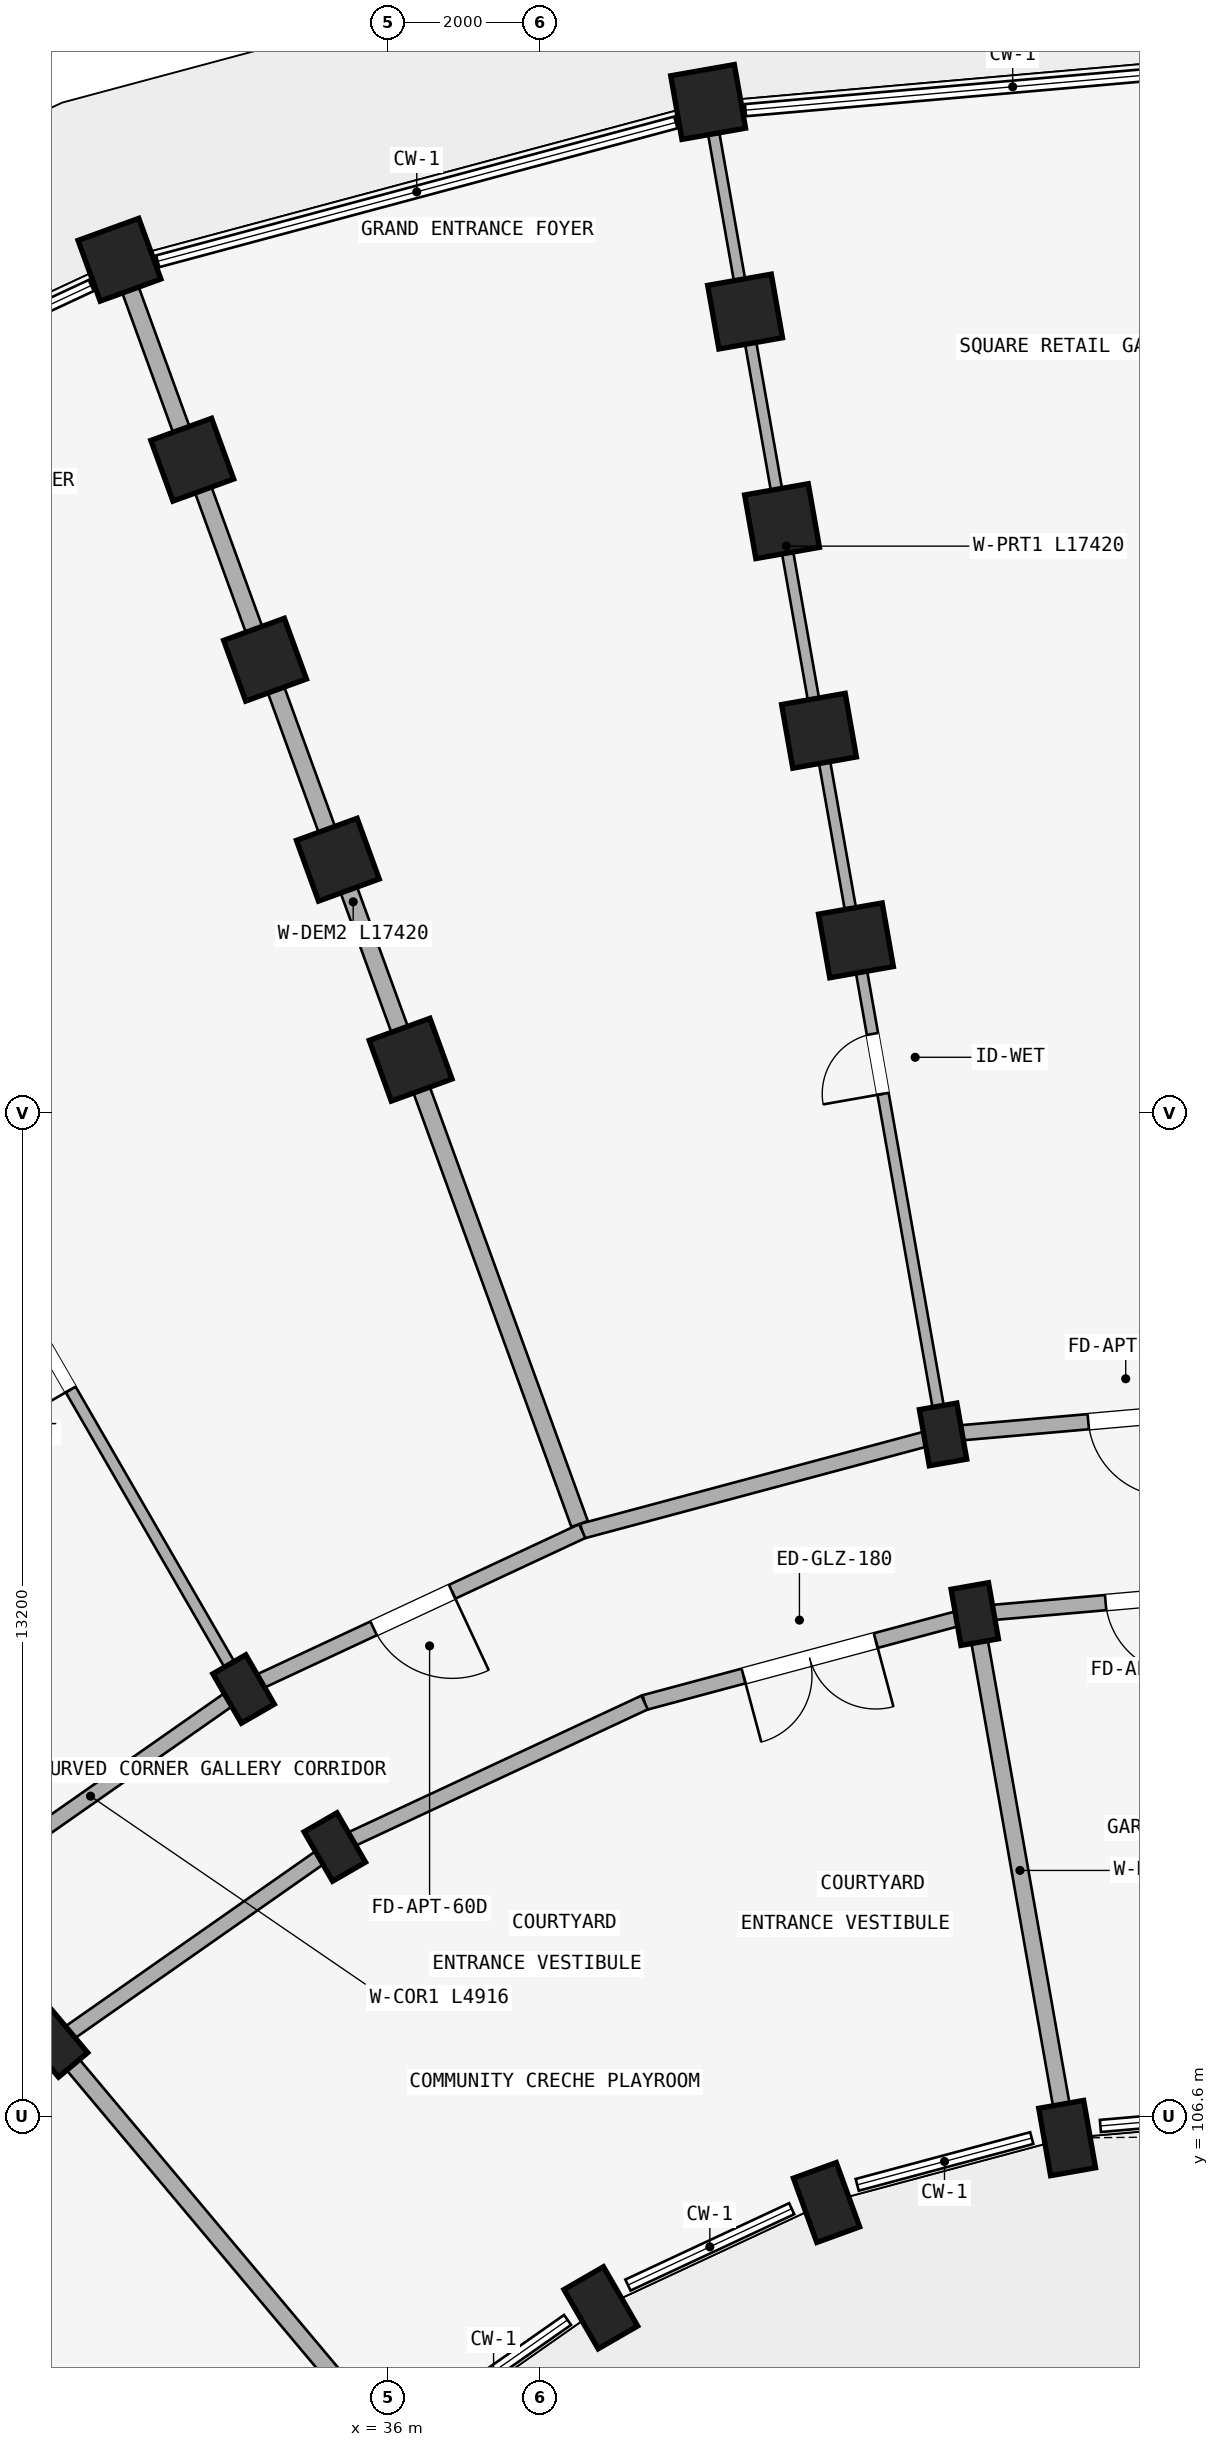
"""IFC4 building model, lengths in metres.
Left out: names, types, materials, properties, quantities, classifications, styles, units other than length and angle.
Written with IfcOpenShell. Run it as: python <this file> out.ifc"""

import sys

from ifc_helpers import new_model, si_unit, direction, frame, frame_2d, origin, origin_2d, place, context, subcontext, project, spatial, rectangle, extrude, element, fill, save


model = new_model("IFC4")
c1 = context("Model", 3, precision=1e-05, world=origin(), true_north=direction((0.0, 1.0)))
c2 = subcontext(c1, "Body", "Model", "MODEL_VIEW")
j1 = project(units=[si_unit("LENGTHUNIT", "METRE"), si_unit("PLANEANGLEUNIT", "RADIAN")], contexts=[c1])
p1 = place(None, origin())
s1 = spatial("IfcSite", under=j1, at=p1, CompositionType="ELEMENT")
p2 = place(p1, origin())
s2 = spatial("IfcBuilding", under=s1, at=p2, CompositionType="ELEMENT")
p3 = place(p2, origin())
s3 = spatial("IfcBuildingStorey", under=s2, at=p3, CompositionType="ELEMENT", Elevation=0.0)
p4 = place(p3, frame((44.935, 106.314, 0.0), z_axis=(0.0, 0.0, 1.0), x_axis=(0.984807753012, 0.173648177667, 0.0)))
e1 = element("IfcColumn", 1, at=p4, inside=s3, PredefinedType="COLUMN", context=c2, shape_type="SweptSolid", body=[
    extrude(rectangle(XDim=0.6, YDim=0.9, at=origin_2d()), origin(), (0.0, 0.0, 1.0), 4.15),
])
for number, where, z_axis, x_axis in (
    (2, (43.72, 113.208, 0.0), (0.0, 0.0, 1.0), (0.985, 0.174, 0.0)),
    (3, (43.303, 115.572, 0.0), (0.0, 0.0, 1.0), (0.985, 0.174, 0.0)),
):
    element("IfcColumn", number, at=place(p3, frame(where, z_axis=z_axis, x_axis=x_axis)), inside=s3, PredefinedType="COLUMN", context=c2, shape_type="SweptSolid", body=[
        extrude(rectangle(XDim=0.5, YDim=0.75, at=origin_2d()), origin(), (0.0, 0.0, 1.0), 4.15),
    ])
for number, where, z_axis, x_axis in (
    (4, (42.157, 122.071, 0.0), (0.0, 0.0, 1.0), (0.985, 0.174, 0.0)),
    (5, (41.671, 124.829, 0.0), (0.0, 0.0, 1.0), (0.985, 0.174, 0.0)),
    (6, (41.185, 127.586, 0.0), (0.0, 0.0, 1.0), (0.985, 0.174, 0.0)),
    (7, (40.698, 130.344, 0.0), (0.0, 0.0, 1.0), (0.985, 0.174, 0.0)),
    (8, (40.212, 133.101, 0.0), (0.0, 0.0, 1.0), (0.985, 0.174, 0.0)),
):
    element("IfcColumn", number, at=place(p3, frame(where, z_axis=z_axis, x_axis=x_axis)), inside=s3, PredefinedType="COLUMN", context=c2, shape_type="SweptSolid", body=[
        extrude(rectangle(XDim=0.85, YDim=0.85, at=origin_2d()), origin(), (0.0, 0.0, 1.0), 4.15),
    ])
p5 = place(p3, frame((41.77, 105.466, 0.0), z_axis=(0.0, 0.0, 1.0), x_axis=(0.939692620786, 0.342020143326, 0.0)))
e9 = element("IfcColumn", 9, at=p5, inside=s3, PredefinedType="COLUMN", context=c2, shape_type="SweptSolid", body=[
    extrude(rectangle(XDim=0.6, YDim=0.9, at=origin_2d()), origin(), (0.0, 0.0, 1.0), 4.15),
])
for number, where, z_axis, x_axis in (
    (10, (36.298, 120.501, 0.0), (0.0, 0.0, 1.0), (0.94, 0.342, 0.0)),
    (11, (35.34, 123.132, 0.0), (0.0, 0.0, 1.0), (0.94, 0.342, 0.0)),
    (12, (34.382, 125.764, 0.0), (0.0, 0.0, 1.0), (0.94, 0.342, 0.0)),
    (13, (33.425, 128.395, 0.0), (0.0, 0.0, 1.0), (0.94, 0.342, 0.0)),
    (14, (32.467, 131.026, 0.0), (0.0, 0.0, 1.0), (0.94, 0.342, 0.0)),
):
    element("IfcColumn", number, at=place(p3, frame(where, z_axis=z_axis, x_axis=x_axis)), inside=s3, PredefinedType="COLUMN", context=c2, shape_type="SweptSolid", body=[
        extrude(rectangle(XDim=0.85, YDim=0.85, at=origin_2d()), origin(), (0.0, 0.0, 1.0), 4.15),
    ])
p6 = place(p3, frame((38.8, 104.081, 0.0), z_axis=(0.0, 0.0, 1.0), x_axis=(0.866025403784, 0.5, 0.0)))
e15 = element("IfcColumn", 15, at=p6, inside=s3, PredefinedType="COLUMN", context=c2, shape_type="SweptSolid", body=[
    extrude(rectangle(XDim=0.6, YDim=0.9, at=origin_2d()), origin(), (0.0, 0.0, 1.0), 4.15),
])
for number, where, z_axis, x_axis in (
    (16, (35.3, 110.144, 0.0), (0.0, 0.0, 1.0), (0.866, 0.5, 0.0)),
    (17, (34.1, 112.222, 0.0), (0.0, 0.0, 1.0), (0.866, 0.5, 0.0)),
    (18, (31.616, 107.564, 0.0), (0.0, 0.0, 1.0), (0.766, 0.643, 0.0)),
):
    element("IfcColumn", number, at=place(p3, frame(where, z_axis=z_axis, x_axis=x_axis)), inside=s3, PredefinedType="COLUMN", context=c2, shape_type="SweptSolid", body=[
        extrude(rectangle(XDim=0.5, YDim=0.75, at=origin_2d()), origin(), (0.0, 0.0, 1.0), 4.15),
    ])
p7 = place(p3, frame((48.2, 113.6, 0.0), z_axis=(0.0, 0.0, 1.0), x_axis=(-0.996191949488, -0.087187153726, 0.0)))
e19 = element("IfcWall", 19, at=p7, inside=s3, PredefinedType="STANDARD", context=c2, shape_type="SweptSolid", body=[
    extrude(rectangle(XDim=4.497, YDim=0.2, at=frame_2d((2.249, 0.0))), origin(), (0.0, 0.0, 1.0), 3.492),
])
p8 = place(p7, frame((1.729, 0.0, 0.0)))
e20 = element("IfcOpeningElement", 20, at=p8, cuts=e19, PredefinedType="OPENING", context=c2, shape_type="SweptSolid", body=[
    extrude(rectangle(XDim=1.04, YDim=2.15, at=frame_2d((0.52, 1.075))), frame((0.0, 0.11, 0.0), z_axis=(0.0, -1.0, 0.0), x_axis=(1.0, 0.0, 0.0)), (0.0, 0.0, 1.0), 0.22),
])
p9 = place(p3, frame((48.2, 116.0, 0.0), z_axis=(0.0, 0.0, 1.0), x_axis=(-0.996193663584, -0.087167566415, 0.0)))
e21 = element("IfcWall", 21, at=p9, inside=s3, PredefinedType="STANDARD", context=c2, shape_type="SweptSolid", body=[
    extrude(rectangle(XDim=4.916, YDim=0.2, at=frame_2d((2.458, 0.0))), origin(), (0.0, 0.0, 1.0), 3.492),
])
p10 = place(p9, frame((1.918, 0.0, 0.0)))
e22 = element("IfcOpeningElement", 22, at=p10, cuts=e21, PredefinedType="OPENING", context=c2, shape_type="SweptSolid", body=[
    extrude(rectangle(XDim=1.08, YDim=2.15, at=frame_2d((0.54, 1.075))), frame((0.0, 0.11, 0.0), z_axis=(0.0, -1.0, 0.0), x_axis=(1.0, 0.0, 0.0)), (0.0, 0.0, 1.0), 0.22),
])
p11 = place(p3, frame((43.72, 113.208, 0.0), z_axis=(0.0, 0.0, 1.0), x_axis=(-0.965934240054, -0.258787642463, 0.0)))
e23 = element("IfcWall", 23, at=p11, inside=s3, PredefinedType="STANDARD", context=c2, shape_type="SweptSolid", body=[
    extrude(rectangle(XDim=4.497, YDim=0.2, at=frame_2d((2.249, 0.0))), origin(), (0.0, 0.0, 1.0), 2.742),
])
p12 = place(p11, frame((1.349, 0.0, 0.0)))
e24 = element("IfcOpeningElement", 24, at=p12, cuts=e23, PredefinedType="OPENING", context=c2, shape_type="SweptSolid", body=[
    extrude(rectangle(XDim=1.8, YDim=2.2, at=frame_2d((0.9, 1.1))), frame((0.0, 0.11, 0.0), z_axis=(0.0, -1.0, 0.0), x_axis=(1.0, 0.0, 0.0)), (0.0, 0.0, 1.0), 0.22),
])
p13 = place(p3, frame((43.303, 115.572, 0.0), z_axis=(0.0, 0.0, 1.0), x_axis=(-0.965930095386, -0.258803112091, 0.0)))
e25 = element("IfcWall", 25, at=p13, inside=s3, PredefinedType="STANDARD", context=c2, shape_type="SweptSolid", body=[
    extrude(rectangle(XDim=4.916, YDim=0.2, at=frame_2d((2.458, 0.0))), origin(), (0.0, 0.0, 1.0), 2.942),
])
p14 = place(p3, frame((39.376, 112.044, 0.0), z_axis=(0.0, 0.0, 1.0), x_axis=(-0.906307919131, -0.422617978463, 0.0)))
e26 = element("IfcWall", 26, at=p14, inside=s3, PredefinedType="STANDARD", context=c2, shape_type="SweptSolid", body=[
    extrude(rectangle(XDim=4.497, YDim=0.2, at=frame_2d((2.249, 0.0))), origin(), (0.0, 0.0, 1.0), 2.742),
])
p15 = place(p3, frame((38.555, 114.299, 0.0), z_axis=(0.0, 0.0, 1.0), x_axis=(-0.906302381024, -0.422629854778, 0.0)))
e27 = element("IfcWall", 27, at=p15, inside=s3, PredefinedType="STANDARD", context=c2, shape_type="SweptSolid", body=[
    extrude(rectangle(XDim=4.915, YDim=0.2, at=frame_2d((2.458, 0.0))), origin(), (0.0, 0.0, 1.0), 2.942),
])
p16 = place(p15, frame((1.888, 0.0, 0.0)))
e28 = element("IfcOpeningElement", 28, at=p16, cuts=e27, PredefinedType="OPENING", context=c2, shape_type="SweptSolid", body=[
    extrude(rectangle(XDim=1.14, YDim=2.15, at=frame_2d((0.57, 1.075))), frame((0.0, 0.11, 0.0), z_axis=(0.0, -1.0, 0.0), x_axis=(1.0, 0.0, 0.0)), (0.0, 0.0, 1.0), 0.22),
])
p17 = place(p3, frame((35.3, 110.144, 0.0), z_axis=(0.0, 0.0, 1.0), x_axis=(-0.819155404658, -0.573571637217, 0.0)))
e29 = element("IfcWall", 29, at=p17, inside=s3, PredefinedType="STANDARD", context=c2, shape_type="SweptSolid", body=[
    extrude(rectangle(XDim=4.497, YDim=0.2, at=frame_2d((2.249, 0.0))), origin(), (0.0, 0.0, 1.0), 3.492),
])
p18 = place(p3, frame((34.1, 112.222, 0.0), z_axis=(0.0, 0.0, 1.0), x_axis=(-0.819140911474, -0.573592335331, 0.0)))
e30 = element("IfcWall", 30, at=p18, inside=s3, PredefinedType="STANDARD", context=c2, shape_type="SweptSolid", body=[
    extrude(rectangle(XDim=4.916, YDim=0.2, at=frame_2d((2.458, 0.0))), origin(), (0.0, 0.0, 1.0), 3.492),
])
p19 = place(p3, frame((31.616, 107.564, 0.0), z_axis=(0.0, 0.0, 1.0), x_axis=(-0.707106781187, -0.707106781187, 0.0)))
e31 = element("IfcWall", 31, at=p19, inside=s3, PredefinedType="STANDARD", context=c2, shape_type="SweptSolid", body=[
    extrude(rectangle(XDim=4.497, YDim=0.2, at=frame_2d((2.249, 0.0))), origin(), (0.0, 0.0, 1.0), 3.492),
])
p20 = place(p19, frame((1.349, 0.0, 0.0)))
e32 = element("IfcOpeningElement", 32, at=p20, cuts=e31, PredefinedType="OPENING", context=c2, shape_type="SweptSolid", body=[
    extrude(rectangle(XDim=1.8, YDim=2.2, at=frame_2d((0.9, 1.1))), frame((0.0, 0.11, 0.0), z_axis=(0.0, -1.0, 0.0), x_axis=(1.0, 0.0, 0.0)), (0.0, 0.0, 1.0), 0.22),
])
p21 = place(p3, frame((44.901, 106.511, 0.0), z_axis=(0.0, 0.0, 1.0), x_axis=(-0.173647089161, 0.984807944945, 0.0)))
e33 = element("IfcWall", 33, at=p21, inside=s3, PredefinedType="STANDARD", context=c2, shape_type="SweptSolid", body=[
    extrude(rectangle(XDim=6.75, YDim=0.22, at=frame_2d((3.375, 0.0))), origin(), (0.0, 0.0, 1.0), 2.742),
])
p22 = place(p3, frame((43.286, 115.67, 0.0), z_axis=(0.0, 0.0, 1.0), x_axis=(-0.173646216546, 0.984808098809, 0.0)))
e34 = element("IfcWall", 34, at=p22, inside=s3, PredefinedType="PARTITIONING", context=c2, shape_type="SweptSolid", body=[
    extrude(rectangle(XDim=17.42, YDim=0.15, at=frame_2d((8.71, 0.0))), origin(), (0.0, 0.0, 1.0), 2.942),
])
p23 = place(p22, frame((4.45, 0.0, 0.0)))
e35 = element("IfcOpeningElement", 35, at=p23, cuts=e34, PredefinedType="OPENING", context=c2, shape_type="SweptSolid", body=[
    extrude(rectangle(XDim=0.8, YDim=2.1, at=frame_2d((0.4, 1.05))), frame((0.0, 0.085, 0.0), z_axis=(0.0, -1.0, 0.0), x_axis=(1.0, 0.0, 0.0)), (0.0, 0.0, 1.0), 0.17),
])
p24 = place(p3, frame((38.521, 114.393, 0.0), z_axis=(0.0, 0.0, 1.0), x_axis=(-0.342022120477, 0.939691901159, 0.0)))
e36 = element("IfcWall", 36, at=p24, inside=s3, PredefinedType="STANDARD", context=c2, shape_type="SweptSolid", body=[
    extrude(rectangle(XDim=17.42, YDim=0.23, at=frame_2d((8.71, 0.0))), origin(), (0.0, 0.0, 1.0), 3.492),
])
p25 = place(p3, frame((34.05, 112.309, 0.0), z_axis=(0.0, 0.0, 1.0), x_axis=(-0.499997843263, 0.866026648973, 0.0)))
e37 = element("IfcWall", 37, at=p25, inside=s3, PredefinedType="PARTITIONING", context=c2, shape_type="SweptSolid", body=[
    extrude(rectangle(XDim=17.42, YDim=0.15, at=frame_2d((8.71, 0.0))), origin(), (0.0, 0.0, 1.0), 2.942),
])
p26 = place(p25, frame((4.45, 0.0, 0.0)))
e38 = element("IfcOpeningElement", 38, at=p26, cuts=e37, PredefinedType="OPENING", context=c2, shape_type="SweptSolid", body=[
    extrude(rectangle(XDim=0.8, YDim=2.1, at=frame_2d((0.4, 1.05))), frame((0.0, 0.085, 0.0), z_axis=(0.0, -1.0, 0.0), x_axis=(1.0, 0.0, 0.0)), (0.0, 0.0, 1.0), 0.17),
])
p27 = place(p3, frame((35.987, 102.355, 0.0), z_axis=(0.0, 0.0, 1.0), x_axis=(-0.642784846501, 0.766046761698, 0.0)))
e39 = element("IfcWall", 39, at=p27, inside=s3, PredefinedType="STANDARD", context=c2, shape_type="SweptSolid", body=[
    extrude(rectangle(XDim=6.75, YDim=0.22, at=frame_2d((3.375, 0.0))), origin(), (0.0, 0.0, 1.0), 3.492),
])
p28 = place(p23, origin())
e40 = element("IfcDoor", 40, at=p28, inside=s3, OperationType="SINGLE_SWING_LEFT", PredefinedType="DOOR", context=c2, shape_type="SweptSolid", body=[
    extrude(rectangle(XDim=0.8, YDim=2.1, at=frame_2d((0.4, 1.05))), frame((0.0, 0.025, 0.0), z_axis=(0.0, -1.0, 0.0), x_axis=(1.0, 0.0, 0.0)), (0.0, 0.0, 1.0), 0.05),
])
fill(e35, e40)
p29 = place(p26, frame((0.8, 0.0, 0.0), z_axis=(0.0, 0.0, 1.0), x_axis=(-1.0, 0.0, 0.0)))
e41 = element("IfcDoor", 41, at=p29, inside=s3, OperationType="SINGLE_SWING_RIGHT", PredefinedType="DOOR", context=c2, shape_type="SweptSolid", body=[
    extrude(rectangle(XDim=0.8, YDim=2.1, at=frame_2d((0.4, 1.05))), frame((0.0, 0.025, 0.0), z_axis=(0.0, -1.0, 0.0), x_axis=(1.0, 0.0, 0.0)), (0.0, 0.0, 1.0), 0.05),
])
fill(e38, e41)
p30 = place(p10, origin())
e42 = element("IfcDoor", 42, at=p30, inside=s3, OperationType="SINGLE_SWING_LEFT", PredefinedType="DOOR", context=c2, shape_type="SweptSolid", body=[
    extrude(rectangle(XDim=1.08, YDim=2.15, at=frame_2d((0.54, 1.075))), frame((0.0, 0.025, 0.0), z_axis=(0.0, -1.0, 0.0), x_axis=(1.0, 0.0, 0.0)), (0.0, 0.0, 1.0), 0.05),
])
fill(e22, e42)
p31 = place(p16, frame((1.14, 0.0, 0.0), z_axis=(0.0, 0.0, 1.0), x_axis=(-1.0, 0.0, 0.0)))
e43 = element("IfcDoor", 43, at=p31, inside=s3, OperationType="SINGLE_SWING_RIGHT", PredefinedType="DOOR", context=c2, shape_type="SweptSolid", body=[
    extrude(rectangle(XDim=1.14, YDim=2.15, at=frame_2d((0.57, 1.075))), frame((0.0, 0.025, 0.0), z_axis=(0.0, -1.0, 0.0), x_axis=(1.0, 0.0, 0.0)), (0.0, 0.0, 1.0), 0.05),
])
fill(e28, e43)
p32 = place(p8, frame((1.04, 0.0, 0.0), z_axis=(0.0, 0.0, 1.0), x_axis=(-1.0, 0.0, 0.0)))
e44 = element("IfcDoor", 44, at=p32, inside=s3, OperationType="SINGLE_SWING_RIGHT", PredefinedType="DOOR", context=c2, shape_type="SweptSolid", body=[
    extrude(rectangle(XDim=1.04, YDim=2.15, at=frame_2d((0.52, 1.075))), frame((0.0, 0.025, 0.0), z_axis=(0.0, -1.0, 0.0), x_axis=(1.0, 0.0, 0.0)), (0.0, 0.0, 1.0), 0.05),
])
fill(e20, e44)
p33 = place(p12, origin())
e45 = element("IfcDoor", 45, at=p33, inside=s3, OperationType="DOUBLE_DOOR_SINGLE_SWING", PredefinedType="DOOR", context=c2, shape_type="SweptSolid", body=[
    extrude(rectangle(XDim=1.8, YDim=2.2, at=frame_2d((0.9, 1.1))), frame((0.0, 0.025, 0.0), z_axis=(0.0, -1.0, 0.0), x_axis=(1.0, 0.0, 0.0)), (0.0, 0.0, 1.0), 0.05),
])
fill(e24, e45)
save(model, sys.argv[1])
